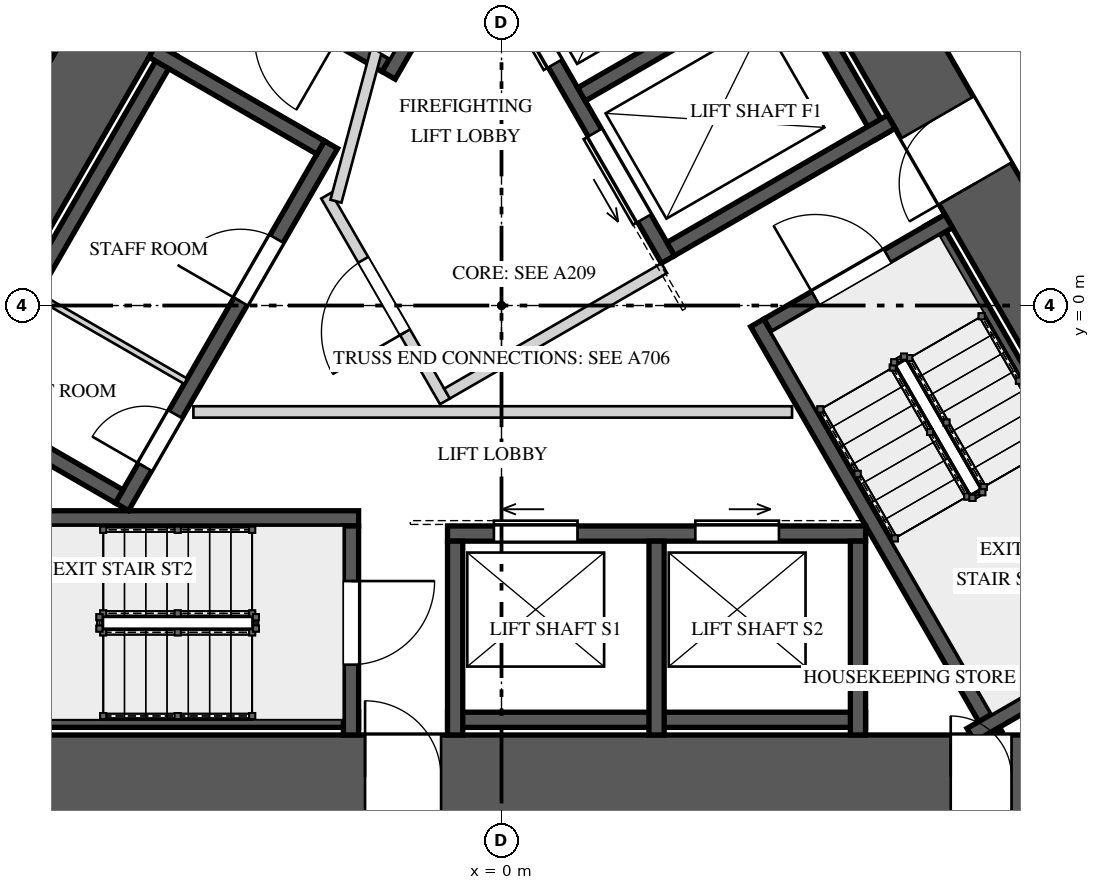
"""IFC4 building model, lengths in metres.
Left out: names, types, materials, properties, quantities, classifications, styles, units other than length and angle.
Written with IfcOpenShell. Run it as: python <this file> out.ifc"""

import sys

from ifc_helpers import new_model, si_unit, direction, frame, frame_2d, origin, place, context, subcontext, project, spatial, rectangle, extrude, element, fill, save


model = new_model("IFC4")
c1 = context("Model", 3, precision=1e-05, world=origin(), true_north=direction((0.0, 1.0)))
c2 = subcontext(c1, "Body", "Model", "MODEL_VIEW")
j1 = project(units=[si_unit("LENGTHUNIT", "METRE"), si_unit("PLANEANGLEUNIT", "RADIAN")], contexts=[c1])
p1 = place(None, origin())
s1 = spatial("IfcSite", under=j1, at=p1, CompositionType="ELEMENT")
p2 = place(p1, origin())
s2 = spatial("IfcBuilding", under=s1, at=p2, CompositionType="ELEMENT")
p3 = place(p2, frame((0.0, 0.0, 46.0)))
s3 = spatial("IfcBuildingStorey", under=s2, at=p3, CompositionType="ELEMENT", Elevation=46.0)
p4 = place(p3, frame((-1.126, 10.45, 0.0), z_axis=(0.0, 0.0, 1.0), x_axis=(-0.500001757713, -0.866024388966, 0.0)))
e1 = element("IfcWall", 1, at=p4, inside=s3, PredefinedType="SHEAR", context=c2, shape_type="SweptSolid", body=[
    extrude(rectangle(XDim=16.974, YDim=1.1, at=frame_2d((8.487, 0.0))), origin(), (0.0, 0.0, 1.0), 5.2),
])
p5 = place(p4, frame((6.692, 0.0, 0.0)))
e2 = element("IfcOpeningElement", 2, at=p5, cuts=e1, PredefinedType="OPENING", context=c2, shape_type="SweptSolid", body=[
    extrude(rectangle(XDim=1.0, YDim=2.4, at=frame_2d((0.5, 1.2))), frame((0.0, 0.56, 0.0), z_axis=(0.0, -1.0, 0.0), x_axis=(1.0, 0.0, 0.0)), (0.0, 0.0, 1.0), 1.12),
])
p6 = place(p3, frame((-8.487, -6.2, 0.0), z_axis=(0.0, 0.0, 1.0), x_axis=(1.0, 0.0, 0.0)))
e3 = element("IfcWall", 3, at=p6, inside=s3, PredefinedType="SHEAR", context=c2, shape_type="SweptSolid", body=[
    extrude(rectangle(XDim=16.974, YDim=1.1, at=frame_2d((8.487, 0.0))), origin(), (0.0, 0.0, 1.0), 5.2),
])
p7 = place(p6, frame((6.692, 0.0, 0.0)))
e4 = element("IfcOpeningElement", 4, at=p7, cuts=e3, PredefinedType="OPENING", context=c2, shape_type="SweptSolid", body=[
    extrude(rectangle(XDim=1.0, YDim=2.4, at=frame_2d((0.5, 1.2))), frame((0.0, 0.56, 0.0), z_axis=(0.0, -1.0, 0.0), x_axis=(1.0, 0.0, 0.0)), (0.0, 0.0, 1.0), 1.12),
])
p8 = place(p6, frame((14.397, 0.0, 0.0)))
e5 = element("IfcOpeningElement", 5, at=p8, cuts=e3, PredefinedType="OPENING", context=c2, shape_type="SweptSolid", body=[
    extrude(rectangle(XDim=0.8, YDim=2.1, at=frame_2d((0.4, 1.05))), frame((0.0, 0.56, 0.0), z_axis=(0.0, -1.0, 0.0), x_axis=(1.0, 0.0, 0.0)), (0.0, 0.0, 1.0), 1.12),
])
p9 = place(p3, frame((9.613, -4.25, 0.0), z_axis=(0.0, 0.0, 1.0), x_axis=(-0.500001757713, 0.866024388966, 0.0)))
e6 = element("IfcWall", 6, at=p9, inside=s3, PredefinedType="SHEAR", context=c2, shape_type="SweptSolid", body=[
    extrude(rectangle(XDim=16.974, YDim=1.1, at=frame_2d((8.487, 0.0))), origin(), (0.0, 0.0, 1.0), 5.2),
])
p10 = place(p9, frame((6.762, 0.0, 0.0)))
e7 = element("IfcOpeningElement", 7, at=p10, cuts=e6, PredefinedType="OPENING", context=c2, shape_type="SweptSolid", body=[
    extrude(rectangle(XDim=1.0, YDim=2.4, at=frame_2d((0.5, 1.2))), frame((0.0, 0.56, 0.0), z_axis=(0.0, -1.0, 0.0), x_axis=(1.0, 0.0, 0.0)), (0.0, 0.0, 1.0), 1.12),
])
p11 = place(p9, frame((13.889, 0.0, 0.0)))
e8 = element("IfcOpeningElement", 8, at=p11, cuts=e6, PredefinedType="OPENING", context=c2, shape_type="SweptSolid", body=[
    extrude(rectangle(XDim=0.8, YDim=2.1, at=frame_2d((0.4, 1.05))), frame((0.0, 0.56, 0.0), z_axis=(0.0, -1.0, 0.0), x_axis=(1.0, 0.0, 0.0)), (0.0, 0.0, 1.0), 1.12),
])
p12 = place(p3, frame((1.646, 8.45, 0.0), z_axis=(0.0, 0.0, 1.0), x_axis=(-0.500006002103, -0.866021938441, 0.0)))
e9 = element("IfcWall", 9, at=p12, inside=s3, PredefinedType="SOLIDWALL", context=c2, shape_type="SweptSolid", body=[
    extrude(rectangle(XDim=6.261, YDim=0.2, at=frame_2d((3.13, 0.0))), origin(), (0.0, 0.0, 1.0), 4.85),
])
p13 = place(p3, frame((-1.521, 3.165, 0.0), z_axis=(0.0, 0.0, 1.0), x_axis=(-0.866027397988, 0.499996545922, 0.0)))
e10 = element("IfcWall", 10, at=p13, inside=s3, PredefinedType="SOLIDWALL", context=c2, shape_type="SweptSolid", body=[
    extrude(rectangle(XDim=2.75, YDim=0.2, at=frame_2d((1.375, 0.0))), origin(), (0.0, 0.0, 1.0), 4.85),
])
p14 = place(p13, frame((0.725, 0.0, 0.0)))
e11 = element("IfcOpeningElement", 11, at=p14, cuts=e10, PredefinedType="OPENING", context=c2, shape_type="SweptSolid", body=[
    extrude(rectangle(XDim=1.1, YDim=2.4, at=frame_2d((0.55, 1.2))), frame((0.0, 0.11, 0.0), z_axis=(0.0, -1.0, 0.0), x_axis=(1.0, 0.0, 0.0)), (0.0, 0.0, 1.0), 0.22),
])
p15 = place(p3, frame((-8.08, -5.45, 0.0), z_axis=(0.0, 0.0, 1.0), x_axis=(1.0, 0.0, 0.0)))
e12 = element("IfcWall", 12, at=p15, inside=s3, PredefinedType="SOLIDWALL", context=c2, shape_type="SweptSolid", body=[
    extrude(rectangle(XDim=6.2, YDim=0.2, at=frame_2d((3.1, 0.0))), origin(), (0.0, 0.0, 1.0), 4.85),
])
p16 = place(p3, frame((-8.141, -2.8, 0.0), z_axis=(0.0, 0.0, 1.0), x_axis=(1.0, 0.0, 0.0)))
e13 = element("IfcWall", 13, at=p16, inside=s3, PredefinedType="SOLIDWALL", context=c2, shape_type="SweptSolid", body=[
    extrude(rectangle(XDim=6.261, YDim=0.2, at=frame_2d((3.13, 0.0))), origin(), (0.0, 0.0, 1.0), 4.85),
])
p17 = place(p3, frame((-1.98, -2.9, 0.0), z_axis=(0.0, 0.0, 1.0), x_axis=(0.0, -1.0, 0.0)))
e14 = element("IfcWall", 14, at=p17, inside=s3, PredefinedType="SOLIDWALL", context=c2, shape_type="SweptSolid", body=[
    extrude(rectangle(XDim=2.75, YDim=0.2, at=frame_2d((1.375, 0.0))), origin(), (0.0, 0.0, 1.0), 4.85),
])
p18 = place(p17, frame((0.725, 0.0, 0.0)))
e15 = element("IfcOpeningElement", 15, at=p18, cuts=e14, PredefinedType="OPENING", context=c2, shape_type="SweptSolid", body=[
    extrude(rectangle(XDim=1.1, YDim=2.4, at=frame_2d((0.55, 1.2))), frame((0.0, 0.11, 0.0), z_axis=(0.0, -1.0, 0.0), x_axis=(1.0, 0.0, 0.0)), (0.0, 0.0, 1.0), 0.22),
])
p19 = place(p3, frame((8.76, -4.272, 0.0), z_axis=(0.0, 0.0, 1.0), x_axis=(-0.49998037582, 0.866036733513, 0.0)))
e16 = element("IfcWall", 16, at=p19, inside=s3, PredefinedType="SOLIDWALL", context=c2, shape_type="SweptSolid", body=[
    extrude(rectangle(XDim=6.2, YDim=0.2, at=frame_2d((3.1, 0.0))), origin(), (0.0, 0.0, 1.0), 4.85),
])
p20 = place(p3, frame((6.495, -5.65, 0.0), z_axis=(0.0, 0.0, 1.0), x_axis=(-0.499976754523, 0.866038824151, 0.0)))
e17 = element("IfcWall", 17, at=p20, inside=s3, PredefinedType="SOLIDWALL", context=c2, shape_type="SweptSolid", body=[
    extrude(rectangle(XDim=6.26, YDim=0.2, at=frame_2d((3.13, 0.0))), origin(), (0.0, 0.0, 1.0), 4.85),
])
p21 = place(p3, frame((6.174, -5.65, 0.0), z_axis=(0.0, 0.0, 1.0), x_axis=(0.866054327916, 0.499949898588, 0.0)))
e18 = element("IfcWall", 18, at=p21, inside=s3, PredefinedType="SOLIDWALL", context=c2, shape_type="SweptSolid", body=[
    extrude(rectangle(XDim=3.128, YDim=0.2, at=frame_2d((1.564, 0.0))), origin(), (0.0, 0.0, 1.0), 4.85),
])
p22 = place(p3, frame((3.501, -0.265, 0.0), z_axis=(0.0, 0.0, 1.0), x_axis=(0.866027397988, 0.499996545922, 0.0)))
e19 = element("IfcWall", 19, at=p22, inside=s3, PredefinedType="SOLIDWALL", context=c2, shape_type="SweptSolid", body=[
    extrude(rectangle(XDim=2.75, YDim=0.2, at=frame_2d((1.375, 0.0))), origin(), (0.0, 0.0, 1.0), 4.85),
])
p23 = place(p22, frame((0.725, 0.0, 0.0)))
e20 = element("IfcOpeningElement", 20, at=p23, cuts=e19, PredefinedType="OPENING", context=c2, shape_type="SweptSolid", body=[
    extrude(rectangle(XDim=1.1, YDim=2.4, at=frame_2d((0.55, 1.2))), frame((0.0, 0.11, 0.0), z_axis=(0.0, -1.0, 0.0), x_axis=(1.0, 0.0, 0.0)), (0.0, 0.0, 1.0), 0.22),
])
p24 = place(p3, frame((-4.993, -2.648, 0.0), z_axis=(0.0, 0.0, 1.0), x_axis=(0.499996545922, 0.866027397988, 0.0)))
e21 = element("IfcWall", 21, at=p24, inside=s3, PredefinedType="SOLIDWALL", context=c2, shape_type="SweptSolid", body=[
    extrude(rectangle(XDim=5.5, YDim=0.2, at=frame_2d((2.75, 0.0))), origin(), (0.0, 0.0, 1.0), 4.85),
])
p25 = place(p24, frame((3.12, 0.0, 0.0)))
e22 = element("IfcOpeningElement", 22, at=p25, cuts=e21, PredefinedType="OPENING", context=c2, shape_type="SweptSolid", body=[
    extrude(rectangle(XDim=0.95, YDim=2.4, at=frame_2d((0.475, 1.2))), frame((0.0, 0.11, 0.0), z_axis=(0.0, -1.0, 0.0), x_axis=(1.0, 0.0, 0.0)), (0.0, 0.0, 1.0), 0.22),
])
p26 = place(p24, frame((0.605, 0.0, 0.0)))
e23 = element("IfcOpeningElement", 23, at=p26, cuts=e21, PredefinedType="OPENING", context=c2, shape_type="SweptSolid", body=[
    extrude(rectangle(XDim=0.8, YDim=2.1, at=frame_2d((0.4, 1.05))), frame((0.0, 0.11, 0.0), z_axis=(0.0, -1.0, 0.0), x_axis=(1.0, 0.0, 0.0)), (0.0, 0.0, 1.0), 0.22),
])
p27 = place(p3, frame((-4.365, 3.34, 0.0), z_axis=(0.0, 0.0, 1.0), x_axis=(-0.499996545922, -0.866027397988, 0.0)))
e24 = element("IfcWall", 24, at=p27, inside=s3, PredefinedType="SOLIDWALL", context=c2, shape_type="SweptSolid", body=[
    extrude(rectangle(XDim=5.5, YDim=0.2, at=frame_2d((2.75, 0.0))), origin(), (0.0, 0.0, 1.0), 4.85),
])
for number, where, z_axis, x_axis in (
    (25, (-2.38, 2.078, 0.0), (0.0, 0.0, 1.0), (-0.866, 0.5, 0.0)),
    (26, (-5.03, -2.512, 0.0), (0.0, 0.0, 1.0), (-0.866, 0.5, 0.0)),
):
    element("IfcWall", number, at=place(p3, frame(where, z_axis=z_axis, x_axis=x_axis)), inside=s3, PredefinedType="SOLIDWALL", context=c2, shape_type="SweptSolid", body=[
        extrude(rectangle(XDim=2.55, YDim=0.2, at=frame_2d((1.275, 0.0))), origin(), (0.0, 0.0, 1.0), 4.85),
    ])
p28 = place(p3, frame((-4.155, -0.996, 0.0), z_axis=(0.0, 0.0, 1.0), x_axis=(-0.866016039709, 0.500016218704, 0.0)))
e27 = element("IfcWall", 27, at=p28, inside=s3, PredefinedType="PARTITIONING", context=c2, shape_type="SweptSolid", body=[
    extrude(rectangle(XDim=2.35, YDim=0.08, at=frame_2d((1.175, 0.0))), origin(), (0.0, 0.0, 1.0), 4.85),
])
p29 = place(p3, frame((-0.71, -3.0, 0.0), z_axis=(0.0, 0.0, 1.0), x_axis=(1.0, 0.0, 0.0)))
e28 = element("IfcWall", 28, at=p29, inside=s3, PredefinedType="SOLIDWALL", context=c2, shape_type="SweptSolid", body=[
    extrude(rectangle(XDim=5.5, YDim=0.2, at=frame_2d((2.75, 0.0))), origin(), (0.0, 0.0, 1.0), 4.85),
])
p30 = place(p29, frame((0.61, 0.0, 0.0)))
e29 = element("IfcOpeningElement", 29, at=p30, cuts=e28, PredefinedType="OPENING", context=c2, shape_type="SweptSolid", body=[
    extrude(rectangle(XDim=1.1, YDim=2.1, at=frame_2d((0.55, 1.05))), frame((0.0, 0.11, 0.0), z_axis=(0.0, -1.0, 0.0), x_axis=(1.0, 0.0, 0.0)), (0.0, 0.0, 1.0), 0.22),
])
p31 = place(p29, frame((3.26, 0.0, 0.0)))
e30 = element("IfcOpeningElement", 30, at=p31, cuts=e28, PredefinedType="OPENING", context=c2, shape_type="SweptSolid", body=[
    extrude(rectangle(XDim=1.1, YDim=2.1, at=frame_2d((0.55, 1.05))), frame((0.0, 0.11, 0.0), z_axis=(0.0, -1.0, 0.0), x_axis=(1.0, 0.0, 0.0)), (0.0, 0.0, 1.0), 0.22),
])
p32 = place(p3, frame((-0.71, -5.45, 0.0), z_axis=(0.0, 0.0, 1.0), x_axis=(1.0, 0.0, 0.0)))
e31 = element("IfcWall", 31, at=p32, inside=s3, PredefinedType="SOLIDWALL", context=c2, shape_type="SweptSolid", body=[
    extrude(rectangle(XDim=5.5, YDim=0.2, at=frame_2d((2.75, 0.0))), origin(), (0.0, 0.0, 1.0), 4.85),
])
for number, where, z_axis, x_axis in (
    (32, (-0.61, -3.1, 0.0), (0.0, 0.0, 1.0), (0.0, -1.0, 0.0)),
    (33, (2.04, -3.1, 0.0), (0.0, 0.0, 1.0), (0.0, -1.0, 0.0)),
    (34, (4.69, -3.1, 0.0), (0.0, 0.0, 1.0), (0.0, -1.0, 0.0)),
):
    element("IfcWall", number, at=place(p3, frame(where, z_axis=z_axis, x_axis=x_axis)), inside=s3, PredefinedType="SOLIDWALL", context=c2, shape_type="SweptSolid", body=[
        extrude(rectangle(XDim=2.55, YDim=0.2, at=frame_2d((1.275, 0.0))), origin(), (0.0, 0.0, 1.0), 4.85),
    ])
p33 = place(p3, frame((2.19, 0.606, 0.0), z_axis=(0.0, 0.0, 1.0), x_axis=(-0.500002801628, 0.866023786258, 0.0)))
e35 = element("IfcWall", 35, at=p33, inside=s3, PredefinedType="SOLIDWALL", context=c2, shape_type="SweptSolid", body=[
    extrude(rectangle(XDim=4.9, YDim=0.2, at=frame_2d((2.45, 0.0))), origin(), (0.0, 0.0, 1.0), 4.85),
])
p34 = place(p33, frame((0.625, 0.0, 0.0)))
e36 = element("IfcOpeningElement", 36, at=p34, cuts=e35, PredefinedType="OPENING", context=c2, shape_type="SweptSolid", body=[
    extrude(rectangle(XDim=1.3, YDim=2.1, at=frame_2d((0.65, 1.05))), frame((0.0, 0.11, 0.0), z_axis=(0.0, -1.0, 0.0), x_axis=(1.0, 0.0, 0.0)), (0.0, 0.0, 1.0), 0.22),
])
p35 = place(p33, frame((2.975, 0.0, 0.0)))
e37 = element("IfcOpeningElement", 37, at=p35, cuts=e35, PredefinedType="OPENING", context=c2, shape_type="SweptSolid", body=[
    extrude(rectangle(XDim=1.3, YDim=2.1, at=frame_2d((0.65, 1.05))), frame((0.0, 0.11, 0.0), z_axis=(0.0, -1.0, 0.0), x_axis=(1.0, 0.0, 0.0)), (0.0, 0.0, 1.0), 0.22),
])
p36 = place(p3, frame((5.005, 2.231, 0.0), z_axis=(0.0, 0.0, 1.0), x_axis=(-0.500002801628, 0.866023786258, 0.0)))
e38 = element("IfcWall", 38, at=p36, inside=s3, PredefinedType="SOLIDWALL", context=c2, shape_type="SweptSolid", body=[
    extrude(rectangle(XDim=4.9, YDim=0.2, at=frame_2d((2.45, 0.0))), origin(), (0.0, 0.0, 1.0), 4.85),
])
p37 = place(p3, frame((2.227, 0.743, 0.0), z_axis=(0.0, 0.0, 1.0), x_axis=(0.866014461049, 0.500018952895, 0.0)))
e39 = element("IfcWall", 39, at=p37, inside=s3, PredefinedType="SOLIDWALL", context=c2, shape_type="SweptSolid", body=[
    extrude(rectangle(XDim=3.35, YDim=0.2, at=frame_2d((1.675, 0.0))), origin(), (0.0, 0.0, 1.0), 4.85),
])
p38 = place(p3, frame((1.052, 2.778, 0.0), z_axis=(0.0, 0.0, 1.0), x_axis=(0.866032680314, 0.499987396469, 0.0)))
e40 = element("IfcWall", 40, at=p38, inside=s3, PredefinedType="SOLIDWALL", context=c2, shape_type="SweptSolid", body=[
    extrude(rectangle(XDim=3.35, YDim=0.2, at=frame_2d((1.675, 0.0))), origin(), (0.0, 0.0, 1.0), 4.85),
])
p39 = place(p3, frame((-0.744, -1.261, 0.0), z_axis=(0.0, 0.0, 1.0), x_axis=(-0.500004234368, 0.866022959057, 0.0)))
e41 = element("IfcWall", 41, at=p39, inside=s3, PredefinedType="PARTITIONING", context=c2, shape_type="SweptSolid", body=[
    extrude(rectangle(XDim=3.125, YDim=0.15, at=frame_2d((1.562, 0.0))), origin(), (0.0, 0.0, 1.0), 4.85),
])
p40 = place(p39, frame((1.05, 0.0, 0.0)))
e42 = element("IfcOpeningElement", 42, at=p40, cuts=e41, PredefinedType="OPENING", context=c2, shape_type="SweptSolid", body=[
    extrude(rectangle(XDim=1.1, YDim=2.4, at=frame_2d((0.55, 1.2))), frame((0.0, 0.085, 0.0), z_axis=(0.0, -1.0, 0.0), x_axis=(1.0, 0.0, 0.0)), (0.0, 0.0, 1.0), 0.17),
])
p41 = place(p3, frame((-0.717, -1.159, 0.0), z_axis=(0.0, 0.0, 1.0), x_axis=(0.866008176907, 0.50002983664, 0.0)))
e43 = element("IfcWall", 43, at=p41, inside=s3, PredefinedType="PARTITIONING", context=c2, shape_type="SweptSolid", body=[
    extrude(rectangle(XDim=3.3, YDim=0.15, at=frame_2d((1.65, 0.0))), origin(), (0.0, 0.0, 1.0), 4.85),
])
p42 = place(p3, frame((-2.178, 1.372, 0.0), z_axis=(0.0, 0.0, 1.0), x_axis=(0.258808958833, 0.96592852884, 0.0)))
e44 = element("IfcWall", 44, at=p42, inside=s3, PredefinedType="PARTITIONING", context=c2, shape_type="SweptSolid", body=[
    extrude(rectangle(XDim=2.903, YDim=0.15, at=frame_2d((1.451, 0.0))), origin(), (0.0, 0.0, 1.0), 4.85),
])
p43 = place(p3, frame((-4.053, -1.4, 0.0), z_axis=(0.0, 0.0, 1.0), x_axis=(1.0, 0.0, 0.0)))
e45 = element("IfcWall", 45, at=p43, inside=s3, PredefinedType="PARTITIONING", context=c2, shape_type="SweptSolid", body=[
    extrude(rectangle(XDim=7.876, YDim=0.15, at=frame_2d((3.938, 0.0))), origin(), (0.0, 0.0, 1.0), 4.85),
])
p44 = place(p18, origin())
e46 = element("IfcDoor", 46, at=p44, inside=s3, OperationType="SINGLE_SWING_LEFT", PredefinedType="DOOR", context=c2, shape_type="SweptSolid", body=[
    extrude(rectangle(XDim=1.1, YDim=2.4, at=frame_2d((0.55, 1.2))), frame((0.0, 0.025, 0.0), z_axis=(0.0, -1.0, 0.0), x_axis=(1.0, 0.0, 0.0)), (0.0, 0.0, 1.0), 0.05),
])
fill(e15, e46)
p45 = place(p23, origin())
e47 = element("IfcDoor", 47, at=p45, inside=s3, OperationType="SINGLE_SWING_RIGHT", PredefinedType="DOOR", context=c2, shape_type="SweptSolid", body=[
    extrude(rectangle(XDim=1.1, YDim=2.4, at=frame_2d((0.55, 1.2))), frame((0.0, 0.025, 0.0), z_axis=(0.0, -1.0, 0.0), x_axis=(1.0, 0.0, 0.0)), (0.0, 0.0, 1.0), 0.05),
])
fill(e20, e47)
p46 = place(p25, origin())
e48 = element("IfcDoor", 48, at=p46, inside=s3, OperationType="SINGLE_SWING_LEFT", PredefinedType="DOOR", context=c2, shape_type="SweptSolid", body=[
    extrude(rectangle(XDim=0.95, YDim=2.4, at=frame_2d((0.475, 1.2))), frame((0.0, 0.025, 0.0), z_axis=(0.0, -1.0, 0.0), x_axis=(1.0, 0.0, 0.0)), (0.0, 0.0, 1.0), 0.05),
])
fill(e22, e48)
p47 = place(p26, origin())
e49 = element("IfcDoor", 49, at=p47, inside=s3, OperationType="SINGLE_SWING_RIGHT", PredefinedType="DOOR", context=c2, shape_type="SweptSolid", body=[
    extrude(rectangle(XDim=0.8, YDim=2.1, at=frame_2d((0.4, 1.05))), frame((0.0, 0.025, 0.0), z_axis=(0.0, -1.0, 0.0), x_axis=(1.0, 0.0, 0.0)), (0.0, 0.0, 1.0), 0.05),
])
fill(e23, e49)
p48 = place(p30, origin())
e50 = element("IfcDoor", 50, at=p48, inside=s3, OperationType="SLIDING_TO_LEFT", PredefinedType="DOOR", context=c2, shape_type="SweptSolid", body=[
    extrude(rectangle(XDim=1.1, YDim=2.1, at=frame_2d((0.55, 1.05))), frame((0.0, 0.025, 0.0), z_axis=(0.0, -1.0, 0.0), x_axis=(1.0, 0.0, 0.0)), (0.0, 0.0, 1.0), 0.05),
])
fill(e29, e50)
p49 = place(p31, origin())
e51 = element("IfcDoor", 51, at=p49, inside=s3, OperationType="SLIDING_TO_RIGHT", PredefinedType="DOOR", context=c2, shape_type="SweptSolid", body=[
    extrude(rectangle(XDim=1.1, YDim=2.1, at=frame_2d((0.55, 1.05))), frame((0.0, 0.025, 0.0), z_axis=(0.0, -1.0, 0.0), x_axis=(1.0, 0.0, 0.0)), (0.0, 0.0, 1.0), 0.05),
])
fill(e30, e51)
p50 = place(p34, origin())
e52 = element("IfcDoor", 52, at=p50, inside=s3, OperationType="SLIDING_TO_LEFT", PredefinedType="DOOR", context=c2, shape_type="SweptSolid", body=[
    extrude(rectangle(XDim=1.3, YDim=2.1, at=frame_2d((0.65, 1.05))), frame((0.0, 0.025, 0.0), z_axis=(0.0, -1.0, 0.0), x_axis=(1.0, 0.0, 0.0)), (0.0, 0.0, 1.0), 0.05),
])
fill(e36, e52)
p51 = place(p35, origin())
e53 = element("IfcDoor", 53, at=p51, inside=s3, OperationType="SLIDING_TO_RIGHT", PredefinedType="DOOR", context=c2, shape_type="SweptSolid", body=[
    extrude(rectangle(XDim=1.3, YDim=2.1, at=frame_2d((0.65, 1.05))), frame((0.0, 0.025, 0.0), z_axis=(0.0, -1.0, 0.0), x_axis=(1.0, 0.0, 0.0)), (0.0, 0.0, 1.0), 0.05),
])
fill(e37, e53)
p52 = place(p40, origin())
e54 = element("IfcDoor", 54, at=p52, inside=s3, OperationType="SINGLE_SWING_LEFT", PredefinedType="DOOR", context=c2, shape_type="SweptSolid", body=[
    extrude(rectangle(XDim=1.1, YDim=2.4, at=frame_2d((0.55, 1.2))), frame((0.0, 0.025, 0.0), z_axis=(0.0, -1.0, 0.0), x_axis=(1.0, 0.0, 0.0)), (0.0, 0.0, 1.0), 0.05),
])
fill(e42, e54)
p53 = place(p7, origin())
e55 = element("IfcDoor", 55, at=p53, inside=s3, OperationType="SINGLE_SWING_LEFT", PredefinedType="DOOR", context=c2, shape_type="SweptSolid", body=[
    extrude(rectangle(XDim=1.0, YDim=2.4, at=frame_2d((0.5, 1.2))), frame((0.0, 0.025, 0.0), z_axis=(0.0, -1.0, 0.0), x_axis=(1.0, 0.0, 0.0)), (0.0, 0.0, 1.0), 0.05),
])
fill(e4, e55)
p54 = place(p10, origin())
e56 = element("IfcDoor", 56, at=p54, inside=s3, OperationType="SINGLE_SWING_RIGHT", PredefinedType="DOOR", context=c2, shape_type="SweptSolid", body=[
    extrude(rectangle(XDim=1.0, YDim=2.4, at=frame_2d((0.5, 1.2))), frame((0.0, 0.025, 0.0), z_axis=(0.0, -1.0, 0.0), x_axis=(1.0, 0.0, 0.0)), (0.0, 0.0, 1.0), 0.05),
])
fill(e7, e56)
p55 = place(p8, origin())
e57 = element("IfcDoor", 57, at=p55, inside=s3, OperationType="SINGLE_SWING_LEFT", PredefinedType="DOOR", context=c2, shape_type="SweptSolid", body=[
    extrude(rectangle(XDim=0.8, YDim=2.1, at=frame_2d((0.4, 1.05))), frame((0.0, 0.025, 0.0), z_axis=(0.0, -1.0, 0.0), x_axis=(1.0, 0.0, 0.0)), (0.0, 0.0, 1.0), 0.05),
])
fill(e5, e57)
save(model, sys.argv[1])
